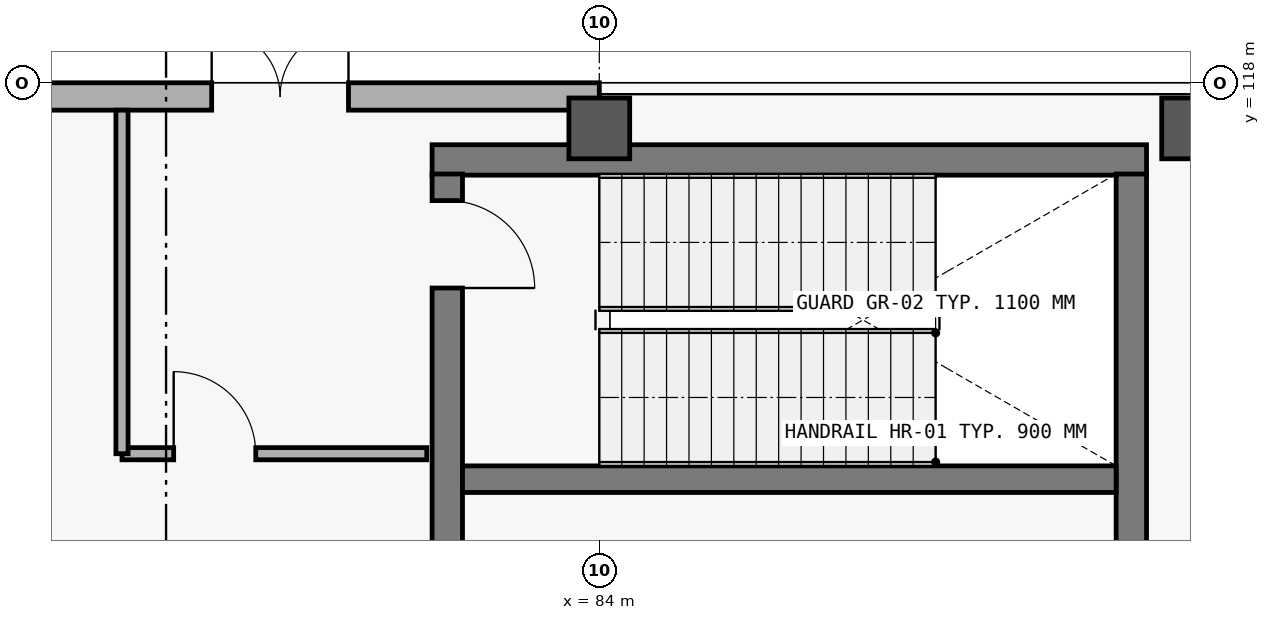
"""IFC4 building model, lengths in metres.
Left out: names, types, materials, properties, quantities, classifications, styles, units other than length and angle.
Written with IfcOpenShell. Run it as: python <this file> out.ifc"""

import sys

from ifc_helpers import new_model, si_unit, direction, frame, frame_2d, origin, origin_2d, place, context, subcontext, project, spatial, rectangle, extrude, element, fill, save


model = new_model("IFC4")
c1 = context("Model", 3, precision=1e-05, world=origin(), true_north=direction((0.0, 1.0)))
c2 = subcontext(c1, "Body", "Model", "MODEL_VIEW")
j1 = project(units=[si_unit("LENGTHUNIT", "METRE"), si_unit("PLANEANGLEUNIT", "RADIAN")], contexts=[c1])
p1 = place(None, origin())
s1 = spatial("IfcSite", under=j1, at=p1, CompositionType="ELEMENT")
p2 = place(p1, origin())
s2 = spatial("IfcBuilding", under=s1, at=p2, CompositionType="ELEMENT")
p3 = place(p2, origin())
s3 = spatial("IfcBuildingStorey", under=s2, at=p3, CompositionType="ELEMENT", Elevation=0.0)
for number, where, z_axis, x_axis in (
    (1, (84.0, 117.4, 0.0), (0.0, 0.0, 1.0), (1.0, 0.0, 0.0)),
    (2, (91.8, 117.4, 0.0), (0.0, 0.0, 1.0), (1.0, 0.0, 0.0)),
):
    element("IfcColumn", number, at=place(p3, frame(where, z_axis=z_axis, x_axis=x_axis)), inside=s3, PredefinedType="COLUMN", context=c2, shape_type="SweptSolid", body=[
        extrude(rectangle(XDim=0.8, YDim=0.8, at=origin_2d()), origin(), (0.0, 0.0, 1.0), 5.4),
    ])
p4 = place(p3, frame((75.6, 117.82, 0.0), z_axis=(0.0, 0.0, 1.0), x_axis=(1.0, 0.0, 0.0)))
e3 = element("IfcWall", 3, at=p4, inside=s3, PredefinedType="SOLIDWALL", context=c2, shape_type="SweptSolid", body=[
    extrude(rectangle(XDim=8.4, YDim=0.36, at=frame_2d((4.2, 0.0))), origin(), (0.0, 0.0, 1.0), 5.08),
])
p5 = place(p4, frame((3.3, 0.0, 0.0)))
e4 = element("IfcOpeningElement", 4, at=p5, cuts=e3, PredefinedType="OPENING", context=c2, shape_type="SweptSolid", body=[
    extrude(rectangle(XDim=1.8, YDim=2.4, at=frame_2d((0.9, 1.2))), frame((0.0, 0.19, 0.0), z_axis=(0.0, -1.0, 0.0), x_axis=(1.0, 0.0, 0.0)), (0.0, 0.0, 1.0), 0.38),
])
p6 = place(p3, frame((91.2, 116.985, 0.0), z_axis=(0.0, 0.0, 1.0), x_axis=(-1.0, 0.0, 0.0)))
e5 = element("IfcWall", 5, at=p6, inside=s3, PredefinedType="SHEAR", context=c2, shape_type="SweptSolid", body=[
    extrude(rectangle(XDim=9.4, YDim=0.4, at=frame_2d((4.7, 0.0))), origin(), (0.0, 0.0, 1.0), 5.08),
])
p7 = place(p3, frame((82.0, 116.8, 0.0), z_axis=(0.0, 0.0, 1.0), x_axis=(0.0, -1.0, 0.0)))
e6 = element("IfcWall", 6, at=p7, inside=s3, PredefinedType="SHEAR", context=c2, shape_type="SweptSolid", body=[
    extrude(rectangle(XDim=7.2, YDim=0.4, at=frame_2d((3.6, 0.0))), origin(), (0.0, 0.0, 1.0), 5.08),
])
p8 = place(p7, frame((0.35, 0.0, 0.0)))
e7 = element("IfcOpeningElement", 7, at=p8, cuts=e6, PredefinedType="OPENING", context=c2, shape_type="SweptSolid", body=[
    extrude(rectangle(XDim=1.15, YDim=2.2, at=frame_2d((0.575, 1.1))), frame((0.0, 0.21, 0.0), z_axis=(0.0, -1.0, 0.0), x_axis=(1.0, 0.0, 0.0)), (0.0, 0.0, 1.0), 0.42),
])
p9 = place(p3, frame((91.0, 109.6, 0.0), z_axis=(0.0, 0.0, 1.0), x_axis=(0.0, 1.0, 0.0)))
e8 = element("IfcWall", 8, at=p9, inside=s3, PredefinedType="SHEAR", context=c2, shape_type="SweptSolid", body=[
    extrude(rectangle(XDim=7.2, YDim=0.4, at=frame_2d((3.6, 0.0))), origin(), (0.0, 0.0, 1.0), 5.08),
])
p10 = place(p3, frame((82.2, 112.785, 0.0), z_axis=(0.0, 0.0, 1.0), x_axis=(1.0, 0.0, 0.0)))
e9 = element("IfcWall", 9, at=p10, inside=s3, PredefinedType="SHEAR", context=c2, shape_type="SweptSolid", body=[
    extrude(rectangle(XDim=8.6, YDim=0.35, at=frame_2d((4.3, 0.0))), origin(), (0.0, 0.0, 1.0), 5.08),
])
p11 = place(p3, frame((77.72, 113.12, 0.0), z_axis=(0.0, 0.0, 1.0), x_axis=(1.0, 0.0, 0.0)))
e10 = element("IfcWall", 10, at=p11, inside=s3, PredefinedType="PARTITIONING", context=c2, shape_type="SweptSolid", body=[
    extrude(rectangle(XDim=4.01, YDim=0.16, at=frame_2d((2.005, 0.0))), origin(), (0.0, 0.0, 1.0), 4.18),
])
p12 = place(p11, frame((0.68, 0.0, 0.0)))
e11 = element("IfcOpeningElement", 11, at=p12, cuts=e10, PredefinedType="OPENING", context=c2, shape_type="SweptSolid", body=[
    extrude(rectangle(XDim=1.08, YDim=2.25, at=frame_2d((0.54, 1.125))), frame((0.0, 0.09, 0.0), z_axis=(0.0, -1.0, 0.0), x_axis=(1.0, 0.0, 0.0)), (0.0, 0.0, 1.0), 0.18),
])
p13 = place(p3, frame((77.72, 113.12, 0.0), z_axis=(0.0, 0.0, 1.0), x_axis=(0.0, 1.0, 0.0)))
e12 = element("IfcWall", 12, at=p13, inside=s3, PredefinedType="PARTITIONING", context=c2, shape_type="SweptSolid", body=[
    extrude(rectangle(XDim=4.52, YDim=0.16, at=frame_2d((2.26, 0.0))), origin(), (0.0, 0.0, 1.0), 4.18),
])
p14 = place(p5, origin())
e13 = element("IfcDoor", 13, at=p14, inside=s3, OperationType="DOUBLE_DOOR_SINGLE_SWING", PredefinedType="DOOR", context=c2, shape_type="SweptSolid", body=[
    extrude(rectangle(XDim=1.8, YDim=2.4, at=frame_2d((0.9, 1.2))), frame((0.0, 0.025, 0.0), z_axis=(0.0, -1.0, 0.0), x_axis=(1.0, 0.0, 0.0)), (0.0, 0.0, 1.0), 0.05),
])
fill(e4, e13)
p15 = place(p8, origin())
e14 = element("IfcDoor", 14, at=p15, inside=s3, OperationType="SINGLE_SWING_RIGHT", PredefinedType="DOOR", context=c2, shape_type="SweptSolid", body=[
    extrude(rectangle(XDim=1.15, YDim=2.2, at=frame_2d((0.575, 1.1))), frame((0.0, 0.025, 0.0), z_axis=(0.0, -1.0, 0.0), x_axis=(1.0, 0.0, 0.0)), (0.0, 0.0, 1.0), 0.05),
])
fill(e7, e14)
p16 = place(p12, origin())
e15 = element("IfcDoor", 15, at=p16, inside=s3, OperationType="SINGLE_SWING_LEFT", PredefinedType="DOOR", context=c2, shape_type="SweptSolid", body=[
    extrude(rectangle(XDim=1.08, YDim=2.25, at=frame_2d((0.54, 1.125))), frame((0.0, 0.025, 0.0), z_axis=(0.0, -1.0, 0.0), x_axis=(1.0, 0.0, 0.0)), (0.0, 0.0, 1.0), 0.05),
])
fill(e11, e15)
save(model, sys.argv[1])
